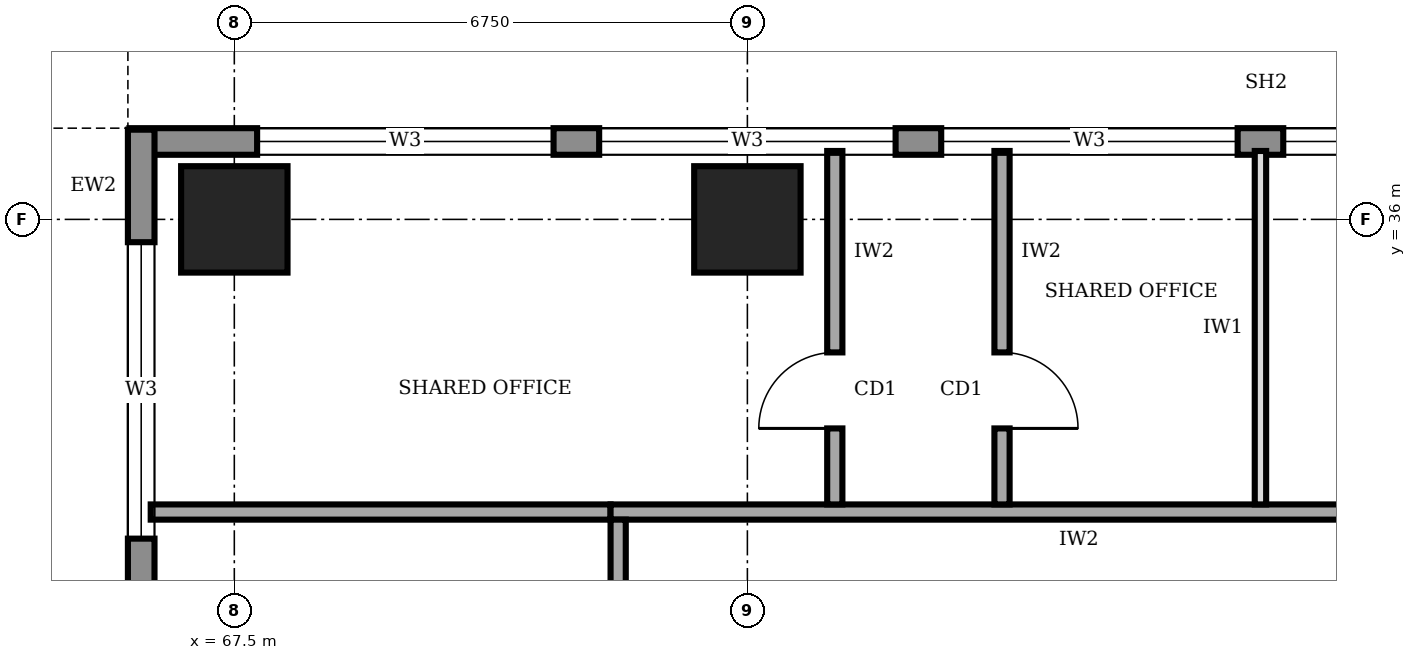
"""IFC4 building model, lengths in metres.
Left out: names, types, materials, properties, quantities, classifications, styles, units other than length and angle.
Written with IfcOpenShell. Run it as: python <this file> out.ifc"""

import sys

from ifc_helpers import new_model, si_unit, direction, frame, frame_2d, origin, origin_2d, place, context, subcontext, project, spatial, rectangle, extrude, element, fill, save


model = new_model("IFC4")
c1 = context("Model", 3, precision=1e-05, world=origin(), true_north=direction((0.0, 1.0)))
c2 = subcontext(c1, "Body", "Model", "MODEL_VIEW")
j1 = project(units=[si_unit("LENGTHUNIT", "METRE"), si_unit("PLANEANGLEUNIT", "RADIAN")], contexts=[c1])
p1 = place(None, origin())
s1 = spatial("IfcSite", under=j1, at=p1, CompositionType="ELEMENT")
p2 = place(p1, origin())
s2 = spatial("IfcBuilding", under=s1, at=p2, CompositionType="ELEMENT")
p3 = place(p2, frame((0.0, 0.0, 185.0)))
s3 = spatial("IfcBuildingStorey", under=s2, at=p3, CompositionType="ELEMENT", Elevation=185.0)
for number, where, z_axis, x_axis in (
    (1, (67.5, 36.0, 0.0), (0.0, 0.0, 1.0), (1.0, 0.0, 0.0)),
    (2, (74.25, 36.0, 0.0), (0.0, 0.0, 1.0), (1.0, 0.0, 0.0)),
):
    element("IfcColumn", number, at=place(p3, frame(where, z_axis=z_axis, x_axis=x_axis)), inside=s3, PredefinedType="COLUMN", context=c2, shape_type="SweptSolid", body=[
        extrude(rectangle(XDim=1.4, YDim=1.4, at=origin_2d()), origin(), (0.0, 0.0, 1.0), 4.0),
    ])
p4 = place(p3, frame((96.03, 37.025, 0.0), z_axis=(0.0, 0.0, 1.0), x_axis=(-1.0, 0.0, 0.0)))
e3 = element("IfcWall", 3, at=p4, inside=s3, PredefinedType="STANDARD", context=c2, shape_type="SweptSolid", body=[
    extrude(rectangle(XDim=29.91, YDim=0.35, at=frame_2d((14.955, 0.0))), origin(), (0.0, 0.0, 1.0), 3.75),
])
p5 = place(p4, frame((24.33, 0.0, 0.95)))
e4 = element("IfcOpeningElement", 4, at=p5, cuts=e3, PredefinedType="OPENING", context=c2, shape_type="SweptSolid", body=[
    extrude(rectangle(XDim=3.9, YDim=1.8, at=frame_2d((1.95, 0.9))), frame((0.0, 0.185, 0.0), z_axis=(0.0, -1.0, 0.0), x_axis=(1.0, 0.0, 0.0)), (0.0, 0.0, 1.0), 0.37),
])
p6 = place(p4, frame((19.83, 0.0, 0.95)))
e5 = element("IfcOpeningElement", 5, at=p6, cuts=e3, PredefinedType="OPENING", context=c2, shape_type="SweptSolid", body=[
    extrude(rectangle(XDim=3.9, YDim=1.8, at=frame_2d((1.95, 0.9))), frame((0.0, 0.185, 0.0), z_axis=(0.0, -1.0, 0.0), x_axis=(1.0, 0.0, 0.0)), (0.0, 0.0, 1.0), 0.37),
])
p7 = place(p4, frame((15.33, 0.0, 0.95)))
e6 = element("IfcOpeningElement", 6, at=p7, cuts=e3, PredefinedType="OPENING", context=c2, shape_type="SweptSolid", body=[
    extrude(rectangle(XDim=3.9, YDim=1.8, at=frame_2d((1.95, 0.9))), frame((0.0, 0.185, 0.0), z_axis=(0.0, -1.0, 0.0), x_axis=(1.0, 0.0, 0.0)), (0.0, 0.0, 1.0), 0.37),
])
p8 = place(p4, frame((10.83, 0.0, 0.95)))
e7 = element("IfcOpeningElement", 7, at=p8, cuts=e3, PredefinedType="OPENING", context=c2, shape_type="SweptSolid", body=[
    extrude(rectangle(XDim=3.9, YDim=1.8, at=frame_2d((1.95, 0.9))), frame((0.0, 0.185, 0.0), z_axis=(0.0, -1.0, 0.0), x_axis=(1.0, 0.0, 0.0)), (0.0, 0.0, 1.0), 0.37),
])
p9 = place(p4, frame((6.33, 0.0, 0.95)))
e8 = element("IfcOpeningElement", 8, at=p9, cuts=e3, PredefinedType="OPENING", context=c2, shape_type="SweptSolid", body=[
    extrude(rectangle(XDim=3.9, YDim=1.8, at=frame_2d((1.95, 0.9))), frame((0.0, 0.185, 0.0), z_axis=(0.0, -1.0, 0.0), x_axis=(1.0, 0.0, 0.0)), (0.0, 0.0, 1.0), 0.37),
])
p10 = place(p4, frame((1.83, 0.0, 0.95)))
e9 = element("IfcOpeningElement", 9, at=p10, cuts=e3, PredefinedType="OPENING", context=c2, shape_type="SweptSolid", body=[
    extrude(rectangle(XDim=3.9, YDim=1.8, at=frame_2d((1.95, 0.9))), frame((0.0, 0.185, 0.0), z_axis=(0.0, -1.0, 0.0), x_axis=(1.0, 0.0, 0.0)), (0.0, 0.0, 1.0), 0.37),
])
p11 = place(p3, frame((66.275, 37.18, 0.0), z_axis=(0.0, 0.0, 1.0), x_axis=(0.0, -1.0, 0.0)))
e10 = element("IfcWall", 10, at=p11, inside=s3, PredefinedType="STANDARD", context=c2, shape_type="SweptSolid", body=[
    extrude(rectangle(XDim=33.86, YDim=0.35, at=frame_2d((16.93, 0.0))), origin(), (0.0, 0.0, 1.0), 3.75),
])
p12 = place(p11, frame((28.48, 0.0, 0.95)))
e11 = element("IfcOpeningElement", 11, at=p12, cuts=e10, PredefinedType="OPENING", context=c2, shape_type="SweptSolid", body=[
    extrude(rectangle(XDim=3.9, YDim=1.8, at=frame_2d((1.95, 0.9))), frame((0.0, 0.185, 0.0), z_axis=(0.0, -1.0, 0.0), x_axis=(1.0, 0.0, 0.0)), (0.0, 0.0, 1.0), 0.37),
])
p13 = place(p11, frame((23.98, 0.0, 0.95)))
e12 = element("IfcOpeningElement", 12, at=p13, cuts=e10, PredefinedType="OPENING", context=c2, shape_type="SweptSolid", body=[
    extrude(rectangle(XDim=3.9, YDim=1.8, at=frame_2d((1.95, 0.9))), frame((0.0, 0.185, 0.0), z_axis=(0.0, -1.0, 0.0), x_axis=(1.0, 0.0, 0.0)), (0.0, 0.0, 1.0), 0.37),
])
p14 = place(p11, frame((19.48, 0.0, 0.95)))
e13 = element("IfcOpeningElement", 13, at=p14, cuts=e10, PredefinedType="OPENING", context=c2, shape_type="SweptSolid", body=[
    extrude(rectangle(XDim=3.9, YDim=1.8, at=frame_2d((1.95, 0.9))), frame((0.0, 0.185, 0.0), z_axis=(0.0, -1.0, 0.0), x_axis=(1.0, 0.0, 0.0)), (0.0, 0.0, 1.0), 0.37),
])
p15 = place(p11, frame((14.98, 0.0, 0.95)))
e14 = element("IfcOpeningElement", 14, at=p15, cuts=e10, PredefinedType="OPENING", context=c2, shape_type="SweptSolid", body=[
    extrude(rectangle(XDim=3.9, YDim=1.8, at=frame_2d((1.95, 0.9))), frame((0.0, 0.185, 0.0), z_axis=(0.0, -1.0, 0.0), x_axis=(1.0, 0.0, 0.0)), (0.0, 0.0, 1.0), 0.37),
])
p16 = place(p11, frame((10.48, 0.0, 0.95)))
e15 = element("IfcOpeningElement", 15, at=p16, cuts=e10, PredefinedType="OPENING", context=c2, shape_type="SweptSolid", body=[
    extrude(rectangle(XDim=3.9, YDim=1.8, at=frame_2d((1.95, 0.9))), frame((0.0, 0.185, 0.0), z_axis=(0.0, -1.0, 0.0), x_axis=(1.0, 0.0, 0.0)), (0.0, 0.0, 1.0), 0.37),
])
p17 = place(p11, frame((5.98, 0.0, 0.95)))
e16 = element("IfcOpeningElement", 16, at=p17, cuts=e10, PredefinedType="OPENING", context=c2, shape_type="SweptSolid", body=[
    extrude(rectangle(XDim=3.9, YDim=1.8, at=frame_2d((1.95, 0.9))), frame((0.0, 0.185, 0.0), z_axis=(0.0, -1.0, 0.0), x_axis=(1.0, 0.0, 0.0)), (0.0, 0.0, 1.0), 0.37),
])
p18 = place(p11, frame((1.48, 0.0, 0.95)))
e17 = element("IfcOpeningElement", 17, at=p18, cuts=e10, PredefinedType="OPENING", context=c2, shape_type="SweptSolid", body=[
    extrude(rectangle(XDim=3.9, YDim=1.8, at=frame_2d((1.95, 0.9))), frame((0.0, 0.185, 0.0), z_axis=(0.0, -1.0, 0.0), x_axis=(1.0, 0.0, 0.0)), (0.0, 0.0, 1.0), 0.37),
])
p19 = place(p3, frame((89.35, 32.15, 0.0), z_axis=(0.0, 0.0, 1.0), x_axis=(-1.0, 0.0, 0.0)))
e18 = element("IfcWall", 18, at=p19, inside=s3, PredefinedType="SOLIDWALL", context=c2, shape_type="SweptSolid", body=[
    extrude(rectangle(XDim=16.9, YDim=0.2, at=frame_2d((8.45, 0.0))), origin(), (0.0, 0.0, 1.0), 3.75),
])
p20 = place(p19, frame((3.575, 0.0, 0.0)))
e19 = element("IfcOpeningElement", 19, at=p20, cuts=e18, PredefinedType="OPENING", context=c2, shape_type="SweptSolid", body=[
    extrude(rectangle(XDim=1.0, YDim=2.1, at=frame_2d((0.5, 1.05))), frame((0.0, 0.11, 0.0), z_axis=(0.0, -1.0, 0.0), x_axis=(1.0, 0.0, 0.0)), (0.0, 0.0, 1.0), 0.22),
])
p21 = place(p3, frame((72.55, 32.05, 0.0), z_axis=(0.0, 0.0, 1.0), x_axis=(0.0, -1.0, 0.0)))
e20 = element("IfcWall", 20, at=p21, inside=s3, PredefinedType="SOLIDWALL", context=c2, shape_type="SweptSolid", body=[
    extrude(rectangle(XDim=23.05, YDim=0.2, at=frame_2d((11.525, 0.0))), origin(), (0.0, 0.0, 1.0), 3.75),
])
p22 = place(p21, frame((20.3, 0.0, 0.0)))
e21 = element("IfcOpeningElement", 21, at=p22, cuts=e20, PredefinedType="OPENING", context=c2, shape_type="SweptSolid", body=[
    extrude(rectangle(XDim=1.0, YDim=2.1, at=frame_2d((0.5, 1.05))), frame((0.0, 0.11, 0.0), z_axis=(0.0, -1.0, 0.0), x_axis=(1.0, 0.0, 0.0)), (0.0, 0.0, 1.0), 0.22),
])
p23 = place(p21, frame((15.875, 0.0, 0.0)))
e22 = element("IfcOpeningElement", 22, at=p23, cuts=e20, PredefinedType="OPENING", context=c2, shape_type="SweptSolid", body=[
    extrude(rectangle(XDim=1.0, YDim=2.1, at=frame_2d((0.5, 1.05))), frame((0.0, 0.11, 0.0), z_axis=(0.0, -1.0, 0.0), x_axis=(1.0, 0.0, 0.0)), (0.0, 0.0, 1.0), 0.22),
])
p24 = place(p21, frame((11.3, 0.0, 0.0)))
e23 = element("IfcOpeningElement", 23, at=p24, cuts=e20, PredefinedType="OPENING", context=c2, shape_type="SweptSolid", body=[
    extrude(rectangle(XDim=1.0, YDim=2.1, at=frame_2d((0.5, 1.05))), frame((0.0, 0.11, 0.0), z_axis=(0.0, -1.0, 0.0), x_axis=(1.0, 0.0, 0.0)), (0.0, 0.0, 1.0), 0.22),
])
p25 = place(p21, frame((6.725, 0.0, 0.0)))
e24 = element("IfcOpeningElement", 24, at=p25, cuts=e20, PredefinedType="OPENING", context=c2, shape_type="SweptSolid", body=[
    extrude(rectangle(XDim=1.0, YDim=2.1, at=frame_2d((0.5, 1.05))), frame((0.0, 0.11, 0.0), z_axis=(0.0, -1.0, 0.0), x_axis=(1.0, 0.0, 0.0)), (0.0, 0.0, 1.0), 0.22),
])
p26 = place(p21, frame((1.925, 0.0, 0.0)))
e25 = element("IfcOpeningElement", 25, at=p26, cuts=e20, PredefinedType="OPENING", context=c2, shape_type="SweptSolid", body=[
    extrude(rectangle(XDim=1.0, YDim=2.1, at=frame_2d((0.5, 1.05))), frame((0.0, 0.11, 0.0), z_axis=(0.0, -1.0, 0.0), x_axis=(1.0, 0.0, 0.0)), (0.0, 0.0, 1.0), 0.22),
])
p27 = place(p3, frame((75.4, 32.25, 0.0), z_axis=(0.0, 0.0, 1.0), x_axis=(0.0, 1.0, 0.0)))
e26 = element("IfcWall", 26, at=p27, inside=s3, PredefinedType="SOLIDWALL", context=c2, shape_type="SweptSolid", body=[
    extrude(rectangle(XDim=4.65, YDim=0.2, at=frame_2d((2.325, 0.0))), origin(), (0.0, 0.0, 1.0), 3.75),
])
p28 = place(p27, frame((1.0, 0.0, 0.0)))
e27 = element("IfcOpeningElement", 27, at=p28, cuts=e26, PredefinedType="OPENING", context=c2, shape_type="SweptSolid", body=[
    extrude(rectangle(XDim=1.0, YDim=2.1, at=frame_2d((0.5, 1.05))), frame((0.0, 0.11, 0.0), z_axis=(0.0, -1.0, 0.0), x_axis=(1.0, 0.0, 0.0)), (0.0, 0.0, 1.0), 0.22),
])
p29 = place(p3, frame((77.6, 36.9, 0.0), z_axis=(0.0, 0.0, 1.0), x_axis=(0.0, -1.0, 0.0)))
e28 = element("IfcWall", 28, at=p29, inside=s3, PredefinedType="SOLIDWALL", context=c2, shape_type="SweptSolid", body=[
    extrude(rectangle(XDim=4.65, YDim=0.2, at=frame_2d((2.325, 0.0))), origin(), (0.0, 0.0, 1.0), 3.75),
])
p30 = place(p29, frame((2.65, 0.0, 0.0)))
e29 = element("IfcOpeningElement", 29, at=p30, cuts=e28, PredefinedType="OPENING", context=c2, shape_type="SweptSolid", body=[
    extrude(rectangle(XDim=1.0, YDim=2.1, at=frame_2d((0.5, 1.05))), frame((0.0, 0.11, 0.0), z_axis=(0.0, -1.0, 0.0), x_axis=(1.0, 0.0, 0.0)), (0.0, 0.0, 1.0), 0.22),
])
p31 = place(p3, frame((66.4, 32.15, 0.0), z_axis=(0.0, 0.0, 1.0), x_axis=(1.0, 0.0, 0.0)))
e30 = element("IfcWall", 30, at=p31, inside=s3, PredefinedType="SOLIDWALL", context=c2, shape_type="SweptSolid", body=[
    extrude(rectangle(XDim=6.05, YDim=0.2, at=frame_2d((3.025, 0.0))), origin(), (0.0, 0.0, 1.0), 3.75),
])
p32 = place(p3, frame((81.0, 32.25, 0.0), z_axis=(0.0, 0.0, 1.0), x_axis=(0.0, 1.0, 0.0)))
e31 = element("IfcWall", 31, at=p32, inside=s3, PredefinedType="PARTITIONING", context=c2, shape_type="SweptSolid", body=[
    extrude(rectangle(XDim=4.65, YDim=0.15, at=frame_2d((2.325, 0.0))), origin(), (0.0, 0.0, 1.0), 3.75),
])
p33 = place(p5, origin())
e32 = element("IfcWindow", 32, at=p33, inside=s3, PartitioningType="SINGLE_PANEL", PredefinedType="WINDOW", context=c2, shape_type="SweptSolid", body=[
    extrude(rectangle(XDim=3.9, YDim=1.8, at=frame_2d((1.95, 0.9))), frame((0.0, 0.03, 0.0), z_axis=(0.0, -1.0, 0.0), x_axis=(1.0, 0.0, 0.0)), (0.0, 0.0, 1.0), 0.06),
])
fill(e4, e32)
p34 = place(p6, origin())
e33 = element("IfcWindow", 33, at=p34, inside=s3, PartitioningType="SINGLE_PANEL", PredefinedType="WINDOW", context=c2, shape_type="SweptSolid", body=[
    extrude(rectangle(XDim=3.9, YDim=1.8, at=frame_2d((1.95, 0.9))), frame((0.0, 0.03, 0.0), z_axis=(0.0, -1.0, 0.0), x_axis=(1.0, 0.0, 0.0)), (0.0, 0.0, 1.0), 0.06),
])
fill(e5, e33)
p35 = place(p7, origin())
e34 = element("IfcWindow", 34, at=p35, inside=s3, PartitioningType="SINGLE_PANEL", PredefinedType="WINDOW", context=c2, shape_type="SweptSolid", body=[
    extrude(rectangle(XDim=3.9, YDim=1.8, at=frame_2d((1.95, 0.9))), frame((0.0, 0.03, 0.0), z_axis=(0.0, -1.0, 0.0), x_axis=(1.0, 0.0, 0.0)), (0.0, 0.0, 1.0), 0.06),
])
fill(e6, e34)
p36 = place(p8, origin())
e35 = element("IfcWindow", 35, at=p36, inside=s3, PartitioningType="SINGLE_PANEL", PredefinedType="WINDOW", context=c2, shape_type="SweptSolid", body=[
    extrude(rectangle(XDim=3.9, YDim=1.8, at=frame_2d((1.95, 0.9))), frame((0.0, 0.03, 0.0), z_axis=(0.0, -1.0, 0.0), x_axis=(1.0, 0.0, 0.0)), (0.0, 0.0, 1.0), 0.06),
])
fill(e7, e35)
p37 = place(p18, origin())
e36 = element("IfcWindow", 36, at=p37, inside=s3, PartitioningType="SINGLE_PANEL", PredefinedType="WINDOW", context=c2, shape_type="SweptSolid", body=[
    extrude(rectangle(XDim=3.9, YDim=1.8, at=frame_2d((1.95, 0.9))), frame((0.0, 0.03, 0.0), z_axis=(0.0, -1.0, 0.0), x_axis=(1.0, 0.0, 0.0)), (0.0, 0.0, 1.0), 0.06),
])
fill(e17, e36)
p38 = place(p28, origin())
e37 = element("IfcDoor", 37, at=p38, inside=s3, OperationType="SINGLE_SWING_LEFT", PredefinedType="DOOR", context=c2, shape_type="SweptSolid", body=[
    extrude(rectangle(XDim=1.0, YDim=2.1, at=frame_2d((0.5, 1.05))), frame((0.0, 0.025, 0.0), z_axis=(0.0, -1.0, 0.0), x_axis=(1.0, 0.0, 0.0)), (0.0, 0.0, 1.0), 0.05),
])
fill(e27, e37)
p39 = place(p30, origin())
e38 = element("IfcDoor", 38, at=p39, inside=s3, OperationType="SINGLE_SWING_RIGHT", PredefinedType="DOOR", context=c2, shape_type="SweptSolid", body=[
    extrude(rectangle(XDim=1.0, YDim=2.1, at=frame_2d((0.5, 1.05))), frame((0.0, 0.025, 0.0), z_axis=(0.0, -1.0, 0.0), x_axis=(1.0, 0.0, 0.0)), (0.0, 0.0, 1.0), 0.05),
])
fill(e29, e38)
save(model, sys.argv[1])
